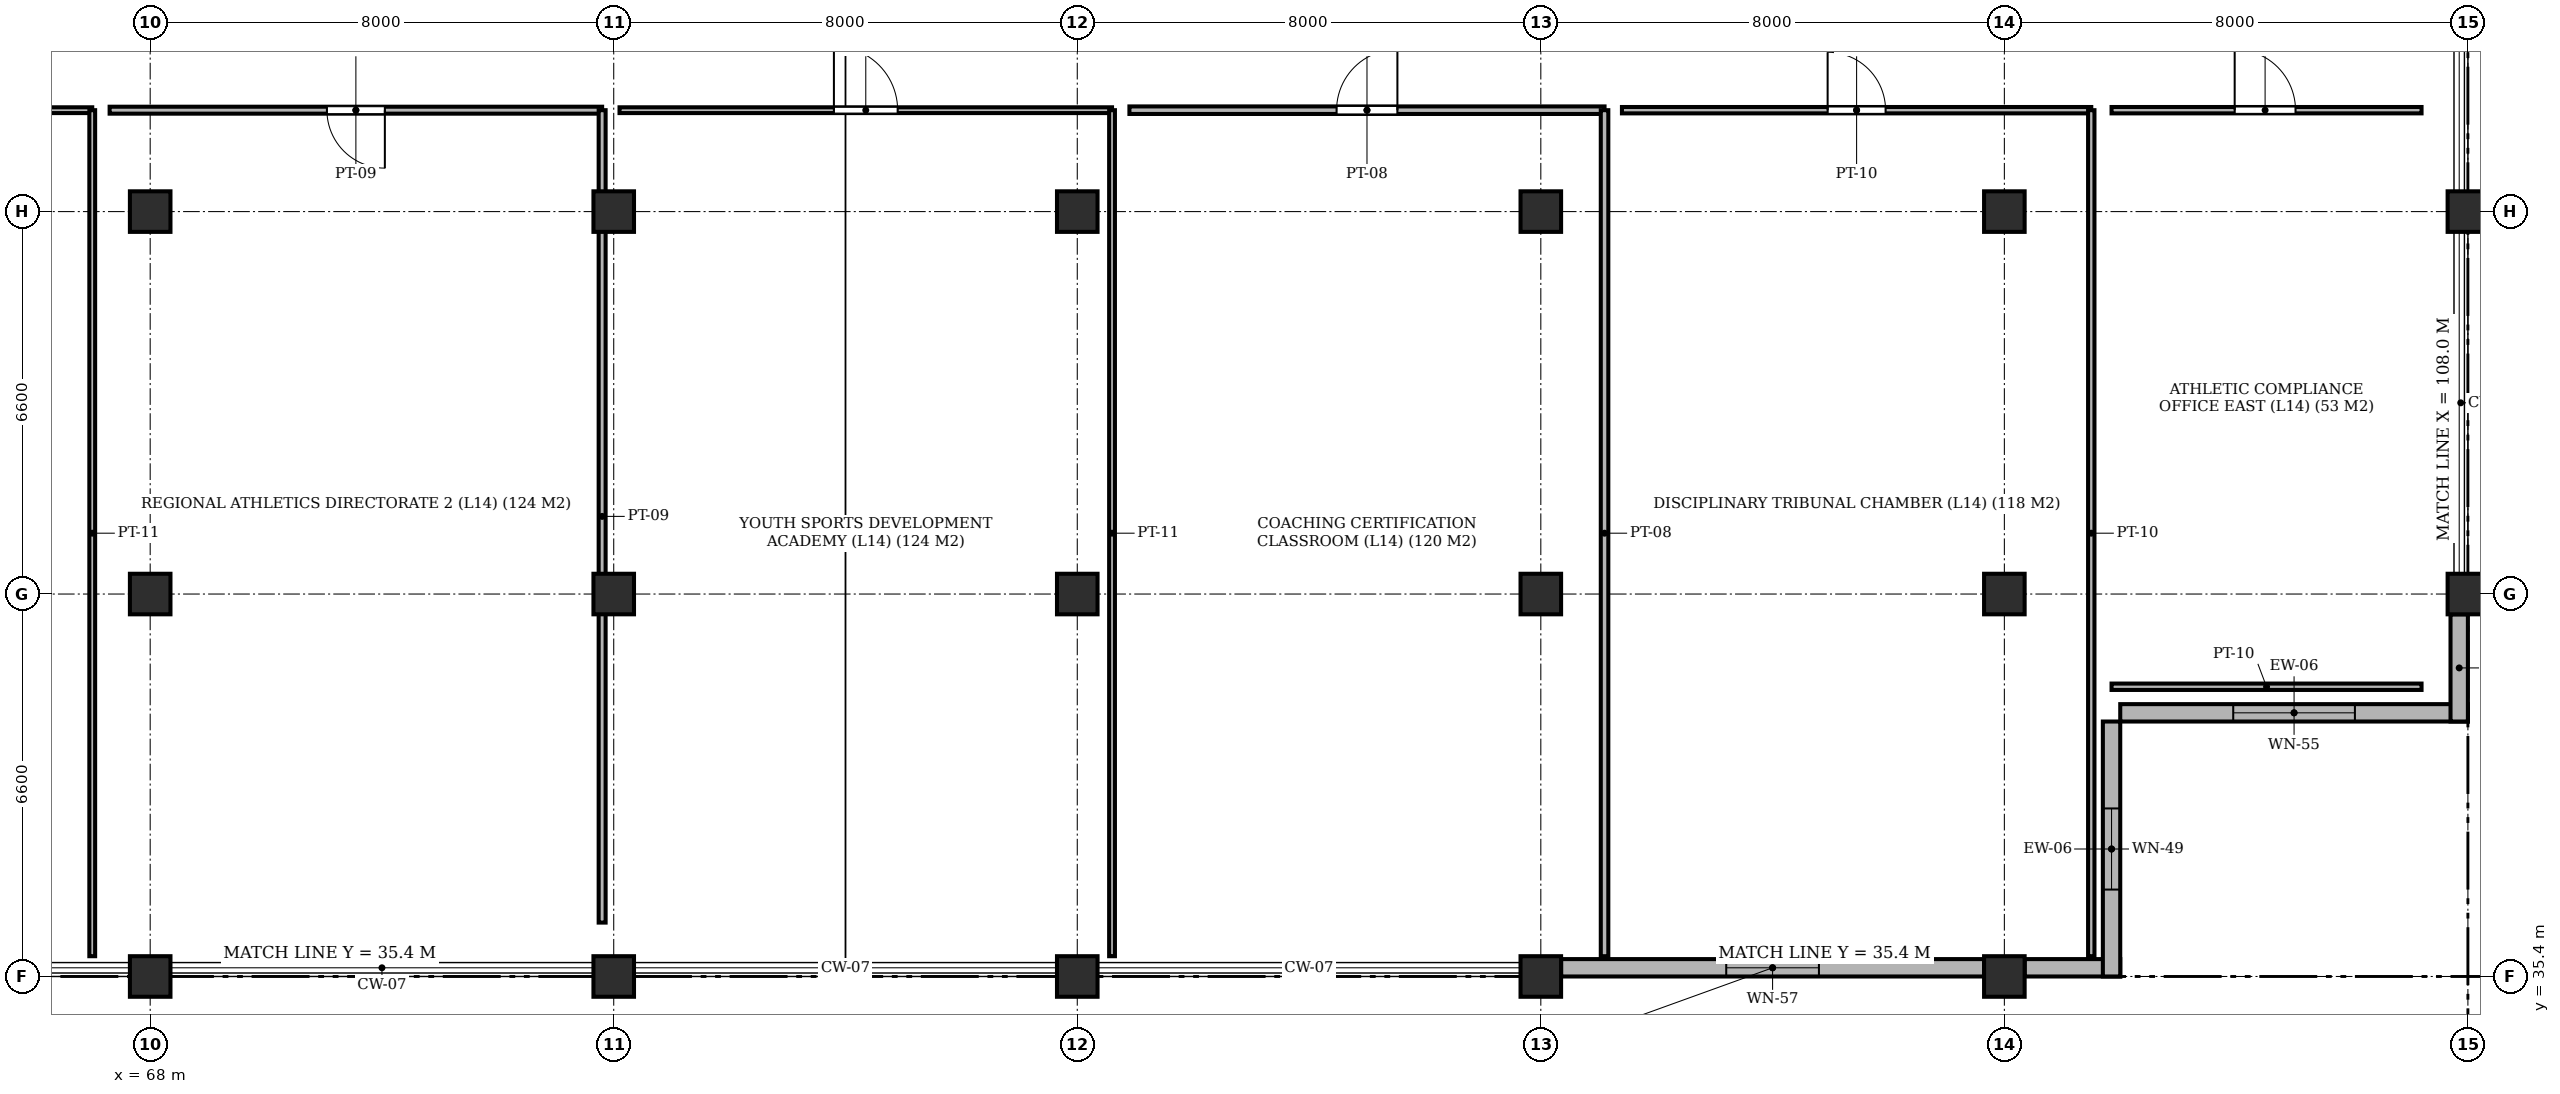
"""IFC4 building model, lengths in metres.
Left out: names, types, materials, properties, quantities, classifications, styles, units other than length and angle.
Written with IfcOpenShell. Run it as: python <this file> out.ifc"""

import sys

from ifc_helpers import new_model, si_unit, direction, frame, frame_2d, origin, origin_2d, place, context, subcontext, project, spatial, rectangle, extrude, element, fill, save


model = new_model("IFC4")
c1 = context("Model", 3, precision=1e-05, world=origin(), true_north=direction((0.0, 1.0)))
c2 = subcontext(c1, "Body", "Model", "MODEL_VIEW")
j1 = project(units=[si_unit("LENGTHUNIT", "METRE"), si_unit("PLANEANGLEUNIT", "RADIAN")], contexts=[c1])
p1 = place(None, origin())
s1 = spatial("IfcSite", under=j1, at=p1, CompositionType="ELEMENT")
p2 = place(p1, origin())
s2 = spatial("IfcBuilding", under=s1, at=p2, CompositionType="ELEMENT")
p3 = place(p2, frame((0.0, 0.0, 56.8)))
s3 = spatial("IfcBuildingStorey", under=s2, at=p3, CompositionType="ELEMENT", Elevation=56.8)
for number, where, z_axis, x_axis in (
    (1, (68.0, 35.4, -0.22), (0.0, 0.0, 1.0), (1.0, 0.0, 0.0)),
    (2, (68.0, 42.0, -0.22), (0.0, 0.0, 1.0), (1.0, 0.0, 0.0)),
    (3, (68.0, 48.6, -0.22), (0.0, 0.0, 1.0), (1.0, 0.0, 0.0)),
    (4, (76.0, 35.4, -0.22), (0.0, 0.0, 1.0), (1.0, 0.0, 0.0)),
    (5, (76.0, 42.0, -0.22), (0.0, 0.0, 1.0), (1.0, 0.0, 0.0)),
    (6, (76.0, 48.6, -0.22), (0.0, 0.0, 1.0), (1.0, 0.0, 0.0)),
    (7, (84.0, 35.4, -0.22), (0.0, 0.0, 1.0), (1.0, 0.0, 0.0)),
    (8, (84.0, 42.0, -0.22), (0.0, 0.0, 1.0), (1.0, 0.0, 0.0)),
    (9, (84.0, 48.6, -0.22), (0.0, 0.0, 1.0), (1.0, 0.0, 0.0)),
    (10, (92.0, 35.4, -0.22), (0.0, 0.0, 1.0), (1.0, 0.0, 0.0)),
    (11, (92.0, 42.0, -0.22), (0.0, 0.0, 1.0), (1.0, 0.0, 0.0)),
    (12, (92.0, 48.6, -0.22), (0.0, 0.0, 1.0), (1.0, 0.0, 0.0)),
    (13, (100.0, 35.4, -0.22), (0.0, 0.0, 1.0), (1.0, 0.0, 0.0)),
    (14, (100.0, 42.0, -0.22), (0.0, 0.0, 1.0), (1.0, 0.0, 0.0)),
    (15, (100.0, 48.6, -0.22), (0.0, 0.0, 1.0), (1.0, 0.0, 0.0)),
    (16, (108.0, 42.0, -0.22), (0.0, 0.0, 1.0), (1.0, 0.0, 0.0)),
    (17, (108.0, 48.6, -0.22), (0.0, 0.0, 1.0), (1.0, 0.0, 0.0)),
):
    element("IfcColumn", number, at=place(p3, frame(where, z_axis=z_axis, x_axis=x_axis)), inside=s3, PredefinedType="COLUMN", context=c2, shape_type="SweptSolid", body=[
        extrude(rectangle(XDim=0.7, YDim=0.7, at=origin_2d()), origin(), (0.0, 0.0, 1.0), 3.26),
    ])
p4 = place(p3, frame((92.35, 35.55, 0.0), z_axis=(0.0, 0.0, 1.0), x_axis=(1.0, 0.0, 0.0)))
e18 = element("IfcWall", 18, at=p4, inside=s3, PredefinedType="SOLIDWALL", context=c2, shape_type="SweptSolid", body=[
    extrude(rectangle(XDim=7.3, YDim=0.3, at=frame_2d((3.65, 0.0))), origin(), (0.0, 0.0, 1.0), 2.53),
])
p5 = place(p4, frame((2.85, 0.0, 0.62)))
e19 = element("IfcOpeningElement", 19, at=p5, cuts=e18, PredefinedType="OPENING", context=c2, shape_type="SweptSolid", body=[
    extrude(rectangle(XDim=1.6, YDim=1.81, at=frame_2d((0.8, 0.905))), frame((0.0, 0.162, 0.0), z_axis=(0.0, -1.0, 0.0), x_axis=(1.0, 0.0, 0.0)), (0.0, 0.0, 1.0), 0.324),
])
p6 = place(p3, frame((100.35, 35.55, 0.0), z_axis=(0.0, 0.0, 1.0), x_axis=(1.0, 0.0, 0.0)))
e20 = element("IfcWall", 20, at=p6, inside=s3, PredefinedType="SOLIDWALL", context=c2, shape_type="SweptSolid", body=[
    extrude(rectangle(XDim=1.65, YDim=0.3, at=frame_2d((0.825, 0.0))), origin(), (0.0, 0.0, 1.0), 2.53),
])
p7 = place(p3, frame((101.85, 35.4, 0.0), z_axis=(0.0, 0.0, 1.0), x_axis=(0.0, 1.0, 0.0)))
e21 = element("IfcWall", 21, at=p7, inside=s3, PredefinedType="SOLIDWALL", context=c2, shape_type="SweptSolid", body=[
    extrude(rectangle(XDim=4.4, YDim=0.3, at=frame_2d((2.2, 0.0))), origin(), (0.0, 0.0, 1.0), 2.53),
])
p8 = place(p7, frame((1.5, 0.0, 0.62)))
e22 = element("IfcOpeningElement", 22, at=p8, cuts=e21, PredefinedType="OPENING", context=c2, shape_type="SweptSolid", body=[
    extrude(rectangle(XDim=1.4, YDim=1.81, at=frame_2d((0.7, 0.905))), frame((0.0, 0.162, 0.0), z_axis=(0.0, -1.0, 0.0), x_axis=(1.0, 0.0, 0.0)), (0.0, 0.0, 1.0), 0.324),
])
p9 = place(p3, frame((102.0, 39.95, 0.0), z_axis=(0.0, 0.0, 1.0), x_axis=(1.0, 0.0, 0.0)))
e23 = element("IfcWall", 23, at=p9, inside=s3, PredefinedType="SOLIDWALL", context=c2, shape_type="SweptSolid", body=[
    extrude(rectangle(XDim=6.0, YDim=0.3, at=frame_2d((3.0, 0.0))), origin(), (0.0, 0.0, 1.0), 2.53),
])
p10 = place(p9, frame((1.95, 0.0, 0.62)))
e24 = element("IfcOpeningElement", 24, at=p10, cuts=e23, PredefinedType="OPENING", context=c2, shape_type="SweptSolid", body=[
    extrude(rectangle(XDim=2.1, YDim=1.81, at=frame_2d((1.05, 0.905))), frame((0.0, 0.162, 0.0), z_axis=(0.0, -1.0, 0.0), x_axis=(1.0, 0.0, 0.0)), (0.0, 0.0, 1.0), 0.324),
])
p11 = place(p3, frame((107.85, 39.8, 0.0), z_axis=(0.0, 0.0, 1.0), x_axis=(0.0, 1.0, 0.0)))
e25 = element("IfcWall", 25, at=p11, inside=s3, PredefinedType="SOLIDWALL", context=c2, shape_type="SweptSolid", body=[
    extrude(rectangle(XDim=1.85, YDim=0.3, at=frame_2d((0.925, 0.0))), origin(), (0.0, 0.0, 1.0), 2.53),
])
p12 = place(p3, frame((59.0, 50.35, 0.0), z_axis=(0.0, 0.0, 1.0), x_axis=(1.0, 0.0, 0.0)))
e26 = element("IfcWall", 26, at=p12, inside=s3, PredefinedType="PARTITIONING", context=c2, shape_type="SweptSolid", body=[
    extrude(rectangle(XDim=8.0, YDim=0.1, at=frame_2d((4.0, 0.0))), origin(), (0.0, 0.0, 1.0), 2.53),
])
p13 = place(p12, frame((3.475, 0.0, 0.0)))
e27 = element("IfcOpeningElement", 27, at=p13, cuts=e26, PredefinedType="OPENING", context=c2, shape_type="SweptSolid", body=[
    extrude(rectangle(XDim=1.05, YDim=2.15, at=frame_2d((0.525, 1.075))), frame((0.0, 0.062, 0.0), z_axis=(0.0, -1.0, 0.0), x_axis=(1.0, 0.0, 0.0)), (0.0, 0.0, 1.0), 0.124),
])
p14 = place(p3, frame((67.0, 35.75, 0.0), z_axis=(0.0, 0.0, 1.0), x_axis=(0.0, 1.0, 0.0)))
e28 = element("IfcWall", 28, at=p14, inside=s3, PredefinedType="PARTITIONING", context=c2, shape_type="SweptSolid", body=[
    extrude(rectangle(XDim=14.6, YDim=0.1, at=frame_2d((7.3, 0.0))), origin(), (0.0, 0.0, 1.0), 2.53),
])
p15 = place(p3, frame((67.3, 50.35, 0.0), z_axis=(0.0, 0.0, 1.0), x_axis=(1.0, 0.0, 0.0)))
e29 = element("IfcWall", 29, at=p15, inside=s3, PredefinedType="PARTITIONING", context=c2, shape_type="SweptSolid", body=[
    extrude(rectangle(XDim=8.5, YDim=0.12, at=frame_2d((4.25, 0.0))), origin(), (0.0, 0.0, 1.0), 2.53),
])
p16 = place(p15, frame((3.75, 0.0, 0.0)))
e30 = element("IfcOpeningElement", 30, at=p16, cuts=e29, PredefinedType="OPENING", context=c2, shape_type="SweptSolid", body=[
    extrude(rectangle(XDim=1.0, YDim=2.15, at=frame_2d((0.5, 1.075))), frame((0.0, 0.072, 0.0), z_axis=(0.0, -1.0, 0.0), x_axis=(1.0, 0.0, 0.0)), (0.0, 0.0, 1.0), 0.144),
])
p17 = place(p3, frame((75.8, 36.33, 0.0), z_axis=(0.0, 0.0, 1.0), x_axis=(0.0, 1.0, 0.0)))
e31 = element("IfcWall", 31, at=p17, inside=s3, PredefinedType="PARTITIONING", context=c2, shape_type="SweptSolid", body=[
    extrude(rectangle(XDim=14.02, YDim=0.12, at=frame_2d((7.01, 0.0))), origin(), (0.0, 0.0, 1.0), 2.53),
])
p18 = place(p3, frame((76.1, 50.35, 0.0), z_axis=(0.0, 0.0, 1.0), x_axis=(1.0, 0.0, 0.0)))
e32 = element("IfcWall", 32, at=p18, inside=s3, PredefinedType="PARTITIONING", context=c2, shape_type="SweptSolid", body=[
    extrude(rectangle(XDim=8.5, YDim=0.1, at=frame_2d((4.25, 0.0))), origin(), (0.0, 0.0, 1.0), 2.53),
])
p19 = place(p18, frame((3.7, 0.0, 0.0)))
e33 = element("IfcOpeningElement", 33, at=p19, cuts=e32, PredefinedType="OPENING", context=c2, shape_type="SweptSolid", body=[
    extrude(rectangle(XDim=1.1, YDim=2.15, at=frame_2d((0.55, 1.075))), frame((0.0, 0.062, 0.0), z_axis=(0.0, -1.0, 0.0), x_axis=(1.0, 0.0, 0.0)), (0.0, 0.0, 1.0), 0.124),
])
p20 = place(p3, frame((84.6, 35.75, 0.0), z_axis=(0.0, 0.0, 1.0), x_axis=(0.0, 1.0, 0.0)))
e34 = element("IfcWall", 34, at=p20, inside=s3, PredefinedType="PARTITIONING", context=c2, shape_type="SweptSolid", body=[
    extrude(rectangle(XDim=14.6, YDim=0.1, at=frame_2d((7.3, 0.0))), origin(), (0.0, 0.0, 1.0), 2.53),
])
p21 = place(p3, frame((84.9, 50.35, 0.0), z_axis=(0.0, 0.0, 1.0), x_axis=(1.0, 0.0, 0.0)))
e35 = element("IfcWall", 35, at=p21, inside=s3, PredefinedType="PARTITIONING", context=c2, shape_type="SweptSolid", body=[
    extrude(rectangle(XDim=8.2, YDim=0.13, at=frame_2d((4.1, 0.0))), origin(), (0.0, 0.0, 1.0), 2.53),
])
p22 = place(p21, frame((3.575, 0.0, 0.0)))
e36 = element("IfcOpeningElement", 36, at=p22, cuts=e35, PredefinedType="OPENING", context=c2, shape_type="SweptSolid", body=[
    extrude(rectangle(XDim=1.05, YDim=2.15, at=frame_2d((0.525, 1.075))), frame((0.0, 0.077, 0.0), z_axis=(0.0, -1.0, 0.0), x_axis=(1.0, 0.0, 0.0)), (0.0, 0.0, 1.0), 0.154),
])
p23 = place(p3, frame((93.1, 35.75, 0.0), z_axis=(0.0, 0.0, 1.0), x_axis=(0.0, 1.0, 0.0)))
e37 = element("IfcWall", 37, at=p23, inside=s3, PredefinedType="PARTITIONING", context=c2, shape_type="SweptSolid", body=[
    extrude(rectangle(XDim=14.6, YDim=0.13, at=frame_2d((7.3, 0.0))), origin(), (0.0, 0.0, 1.0), 2.53),
])
p24 = place(p3, frame((93.4, 50.35, 0.0), z_axis=(0.0, 0.0, 1.0), x_axis=(1.0, 0.0, 0.0)))
e38 = element("IfcWall", 38, at=p24, inside=s3, PredefinedType="PARTITIONING", context=c2, shape_type="SweptSolid", body=[
    extrude(rectangle(XDim=8.1, YDim=0.11, at=frame_2d((4.05, 0.0))), origin(), (0.0, 0.0, 1.0), 2.53),
])
p25 = place(p24, frame((3.55, 0.0, 0.0)))
e39 = element("IfcOpeningElement", 39, at=p25, cuts=e38, PredefinedType="OPENING", context=c2, shape_type="SweptSolid", body=[
    extrude(rectangle(XDim=1.0, YDim=2.15, at=frame_2d((0.5, 1.075))), frame((0.0, 0.067, 0.0), z_axis=(0.0, -1.0, 0.0), x_axis=(1.0, 0.0, 0.0)), (0.0, 0.0, 1.0), 0.134),
])
p26 = place(p3, frame((101.5, 35.75, 0.0), z_axis=(0.0, 0.0, 1.0), x_axis=(0.0, 1.0, 0.0)))
e40 = element("IfcWall", 40, at=p26, inside=s3, PredefinedType="PARTITIONING", context=c2, shape_type="SweptSolid", body=[
    extrude(rectangle(XDim=14.6, YDim=0.11, at=frame_2d((7.3, 0.0))), origin(), (0.0, 0.0, 1.0), 2.53),
])
p27 = place(p3, frame((101.85, 40.4, 0.0), z_axis=(0.0, 0.0, 1.0), x_axis=(1.0, 0.0, 0.0)))
e41 = element("IfcWall", 41, at=p27, inside=s3, PredefinedType="PARTITIONING", context=c2, shape_type="SweptSolid", body=[
    extrude(rectangle(XDim=5.35, YDim=0.11, at=frame_2d((2.675, 0.0))), origin(), (0.0, 0.0, 1.0), 2.53),
])
p28 = place(p3, frame((101.85, 50.35, 0.0), z_axis=(0.0, 0.0, 1.0), x_axis=(1.0, 0.0, 0.0)))
e42 = element("IfcWall", 42, at=p28, inside=s3, PredefinedType="PARTITIONING", context=c2, shape_type="SweptSolid", body=[
    extrude(rectangle(XDim=5.35, YDim=0.11, at=frame_2d((2.675, 0.0))), origin(), (0.0, 0.0, 1.0), 2.53),
])
p29 = place(p28, frame((2.125, 0.0, 0.0)))
e43 = element("IfcOpeningElement", 43, at=p29, cuts=e42, PredefinedType="OPENING", context=c2, shape_type="SweptSolid", body=[
    extrude(rectangle(XDim=1.05, YDim=2.15, at=frame_2d((0.525, 1.075))), frame((0.0, 0.067, 0.0), z_axis=(0.0, -1.0, 0.0), x_axis=(1.0, 0.0, 0.0)), (0.0, 0.0, 1.0), 0.134),
])
p30 = place(p5, origin())
e44 = element("IfcWindow", 44, at=p30, inside=s3, PartitioningType="SINGLE_PANEL", PredefinedType="WINDOW", context=c2, shape_type="SweptSolid", body=[
    extrude(rectangle(XDim=1.6, YDim=1.81, at=frame_2d((0.8, 0.905))), frame((0.0, 0.03, 0.0), z_axis=(0.0, -1.0, 0.0), x_axis=(1.0, 0.0, 0.0)), (0.0, 0.0, 1.0), 0.06),
])
fill(e19, e44)
p31 = place(p8, origin())
e45 = element("IfcWindow", 45, at=p31, inside=s3, PartitioningType="SINGLE_PANEL", PredefinedType="WINDOW", context=c2, shape_type="SweptSolid", body=[
    extrude(rectangle(XDim=1.4, YDim=1.81, at=frame_2d((0.7, 0.905))), frame((0.0, 0.03, 0.0), z_axis=(0.0, -1.0, 0.0), x_axis=(1.0, 0.0, 0.0)), (0.0, 0.0, 1.0), 0.06),
])
fill(e22, e45)
p32 = place(p10, origin())
e46 = element("IfcWindow", 46, at=p32, inside=s3, PartitioningType="SINGLE_PANEL", PredefinedType="WINDOW", context=c2, shape_type="SweptSolid", body=[
    extrude(rectangle(XDim=2.1, YDim=1.81, at=frame_2d((1.05, 0.905))), frame((0.0, 0.03, 0.0), z_axis=(0.0, -1.0, 0.0), x_axis=(1.0, 0.0, 0.0)), (0.0, 0.0, 1.0), 0.06),
])
fill(e24, e46)
p33 = place(p16, frame((1.0, 0.0, 0.0), z_axis=(0.0, 0.0, 1.0), x_axis=(-1.0, 0.0, 0.0)))
e47 = element("IfcDoor", 47, at=p33, inside=s3, OperationType="SINGLE_SWING_RIGHT", PredefinedType="DOOR", context=c2, shape_type="SweptSolid", body=[
    extrude(rectangle(XDim=1.0, YDim=2.15, at=frame_2d((0.5, 1.075))), frame((0.0, 0.025, 0.0), z_axis=(0.0, -1.0, 0.0), x_axis=(1.0, 0.0, 0.0)), (0.0, 0.0, 1.0), 0.05),
])
fill(e30, e47)
p34 = place(p19, origin())
e48 = element("IfcDoor", 48, at=p34, inside=s3, OperationType="SINGLE_SWING_LEFT", PredefinedType="DOOR", context=c2, shape_type="SweptSolid", body=[
    extrude(rectangle(XDim=1.1, YDim=2.15, at=frame_2d((0.55, 1.075))), frame((0.0, 0.025, 0.0), z_axis=(0.0, -1.0, 0.0), x_axis=(1.0, 0.0, 0.0)), (0.0, 0.0, 1.0), 0.05),
])
fill(e33, e48)
p35 = place(p22, origin())
e49 = element("IfcDoor", 49, at=p35, inside=s3, OperationType="SINGLE_SWING_RIGHT", PredefinedType="DOOR", context=c2, shape_type="SweptSolid", body=[
    extrude(rectangle(XDim=1.05, YDim=2.15, at=frame_2d((0.525, 1.075))), frame((0.0, 0.025, 0.0), z_axis=(0.0, -1.0, 0.0), x_axis=(1.0, 0.0, 0.0)), (0.0, 0.0, 1.0), 0.05),
])
fill(e36, e49)
p36 = place(p25, origin())
e50 = element("IfcDoor", 50, at=p36, inside=s3, OperationType="SINGLE_SWING_LEFT", PredefinedType="DOOR", context=c2, shape_type="SweptSolid", body=[
    extrude(rectangle(XDim=1.0, YDim=2.15, at=frame_2d((0.5, 1.075))), frame((0.0, 0.025, 0.0), z_axis=(0.0, -1.0, 0.0), x_axis=(1.0, 0.0, 0.0)), (0.0, 0.0, 1.0), 0.05),
])
fill(e39, e50)
p37 = place(p29, origin())
e51 = element("IfcDoor", 51, at=p37, inside=s3, OperationType="SINGLE_SWING_LEFT", PredefinedType="DOOR", context=c2, shape_type="SweptSolid", body=[
    extrude(rectangle(XDim=1.05, YDim=2.15, at=frame_2d((0.525, 1.075))), frame((0.0, 0.025, 0.0), z_axis=(0.0, -1.0, 0.0), x_axis=(1.0, 0.0, 0.0)), (0.0, 0.0, 1.0), 0.05),
])
fill(e43, e51)
save(model, sys.argv[1])
